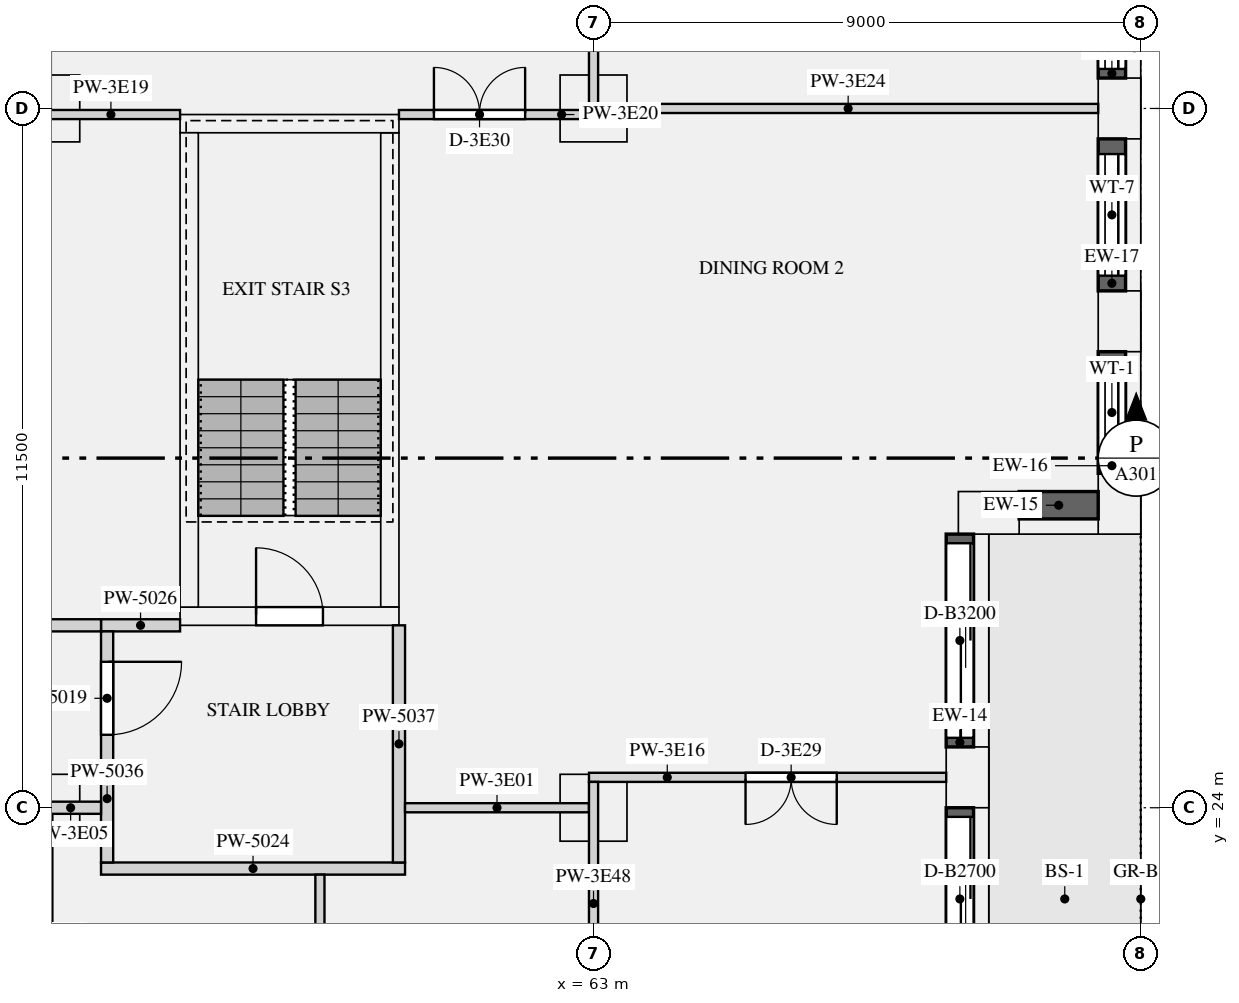
"""IFC4 building model, lengths in metres.
Left out: names, types, materials, properties, quantities, classifications, styles, units other than length and angle.
Written with IfcOpenShell. Run it as: python <this file> out.ifc"""

import sys

from ifc_helpers import new_model, si_unit, direction, frame, frame_2d, origin, origin_2d, place, context, subcontext, project, spatial, rectangle, extrude, element, fill, save


model = new_model("IFC4")
c1 = context("Model", 3, precision=1e-05, world=origin(), true_north=direction((0.0, 1.0)))
c2 = subcontext(c1, "Body", "Model", "MODEL_VIEW")
j1 = project(units=[si_unit("LENGTHUNIT", "METRE"), si_unit("PLANEANGLEUNIT", "RADIAN")], contexts=[c1])
p1 = place(None, origin())
s1 = spatial("IfcSite", under=j1, at=p1, CompositionType="ELEMENT")
p2 = place(p1, origin())
s2 = spatial("IfcBuilding", under=s1, at=p2, CompositionType="ELEMENT")
p3 = place(p2, frame((0.0, 0.0, 172.8)))
s3 = spatial("IfcBuildingStorey", under=s2, at=p3, CompositionType="ELEMENT", Elevation=172.8)
for number, where, z_axis, x_axis in (
    (1, (69.15, 24.5, 0.0), (0.0, 0.0, 1.0), (0.0, 1.0, 0.0)),
    (2, (69.5, 28.85, 0.0), (0.0, 0.0, 1.0), (1.0, 0.0, 0.0)),
    (3, (71.65, 29.0, 0.0), (0.0, 0.0, 1.0), (0.0, 1.0, 0.0)),
    (4, (71.65, 32.0, 0.0), (0.0, 0.0, 1.0), (0.0, 1.0, 0.0)),
    (5, (71.65, 35.5, 0.0), (0.0, 0.0, 1.0), (0.0, 1.0, 0.0)),
):
    element("IfcColumn", number, at=place(p3, frame(where, z_axis=z_axis, x_axis=x_axis)), inside=s3, PredefinedType="USERDEFINED", context=c2, shape_type="SweptSolid", body=[
        extrude(rectangle(XDim=1.0, YDim=0.7, at=origin_2d()), origin(), (0.0, 0.0, 1.0), 3.15),
    ])
for number, where, z_axis, x_axis in (
    (6, (54.0, 24.0, 0.0), (0.0, 0.0, 1.0), (1.0, 0.0, 0.0)),
    (7, (63.0, 24.0, 0.0), (0.0, 0.0, 1.0), (1.0, 0.0, 0.0)),
    (8, (54.0, 35.5, 0.0), (0.0, 0.0, 1.0), (1.0, 0.0, 0.0)),
    (9, (63.0, 35.5, 0.0), (0.0, 0.0, 1.0), (1.0, 0.0, 0.0)),
):
    element("IfcColumn", number, at=place(p3, frame(where, z_axis=z_axis, x_axis=x_axis)), inside=s3, PredefinedType="COLUMN", context=c2, shape_type="SweptSolid", body=[
        extrude(rectangle(XDim=1.1, YDim=1.1, at=origin_2d()), origin(), (0.0, 0.0, 1.0), 3.15),
    ])
p4 = place(p3, frame((56.2, 27.15, 0.0), z_axis=(0.0, 0.0, 1.0), x_axis=(1.0, 0.0, 0.0)))
e10 = element("IfcWall", 10, at=p4, inside=s3, PredefinedType="SHEAR", context=c2, shape_type="SweptSolid", body=[
    extrude(rectangle(XDim=3.6, YDim=0.3, at=frame_2d((1.8, 0.0))), origin(), (0.0, 0.0, 1.0), 3.15),
])
p5 = place(p4, frame((1.25, 0.0, 0.0)))
e11 = element("IfcOpeningElement", 11, at=p5, cuts=e10, PredefinedType="OPENING", context=c2, shape_type="SweptSolid", body=[
    extrude(rectangle(XDim=1.1, YDim=2.1, at=frame_2d((0.55, 1.05))), frame((0.0, 0.16, 0.0), z_axis=(0.0, -1.0, 0.0), x_axis=(1.0, 0.0, 0.0)), (0.0, 0.0, 1.0), 0.32),
])
p6 = place(p3, frame((56.2, 35.25, 0.0), z_axis=(0.0, 0.0, 1.0), x_axis=(1.0, 0.0, 0.0)))
e12 = element("IfcWall", 12, at=p6, inside=s3, PredefinedType="SHEAR", context=c2, shape_type="SweptSolid", body=[
    extrude(rectangle(XDim=3.6, YDim=0.3, at=frame_2d((1.8, 0.0))), origin(), (0.0, 0.0, 1.0), 3.15),
])
for number, where, z_axis, x_axis in (
    (13, (56.35, 27.3, 0.0), (0.0, 0.0, 1.0), (0.0, 1.0, 0.0)),
    (14, (59.65, 27.3, 0.0), (0.0, 0.0, 1.0), (0.0, 1.0, 0.0)),
):
    element("IfcWall", number, at=place(p3, frame(where, z_axis=z_axis, x_axis=x_axis)), inside=s3, PredefinedType="SHEAR", context=c2, shape_type="SweptSolid", body=[
        extrude(rectangle(XDim=7.8, YDim=0.3, at=frame_2d((3.9, 0.0))), origin(), (0.0, 0.0, 1.0), 3.15),
    ])
p7 = place(p3, frame((69.025, 21.0, 0.0), z_axis=(0.0, 0.0, 1.0), x_axis=(0.0, 1.0, 0.0)))
e15 = element("IfcWall", 15, at=p7, inside=s3, PredefinedType="SOLIDWALL", context=c2, shape_type="SweptSolid", body=[
    extrude(rectangle(XDim=3.0, YDim=0.45, at=frame_2d((1.5, 0.0))), origin(), (0.0, 0.0, 1.0), 2.83),
])
p8 = place(p7, frame((0.15, 0.0, 0.0)))
e16 = element("IfcOpeningElement", 16, at=p8, cuts=e15, PredefinedType="OPENING", context=c2, shape_type="SweptSolid", body=[
    extrude(rectangle(XDim=2.7, YDim=2.3, at=frame_2d((1.35, 1.15))), frame((0.0, 0.235, 0.0), z_axis=(0.0, -1.0, 0.0), x_axis=(1.0, 0.0, 0.0)), (0.0, 0.0, 1.0), 0.47),
])
p9 = place(p3, frame((69.025, 25.0, 0.0), z_axis=(0.0, 0.0, 1.0), x_axis=(0.0, 1.0, 0.0)))
e17 = element("IfcWall", 17, at=p9, inside=s3, PredefinedType="SOLIDWALL", context=c2, shape_type="SweptSolid", body=[
    extrude(rectangle(XDim=3.5, YDim=0.45, at=frame_2d((1.75, 0.0))), origin(), (0.0, 0.0, 1.0), 2.83),
])
p10 = place(p9, frame((0.15, 0.0, 0.0)))
e18 = element("IfcOpeningElement", 18, at=p10, cuts=e17, PredefinedType="OPENING", context=c2, shape_type="SweptSolid", body=[
    extrude(rectangle(XDim=3.2, YDim=2.3, at=frame_2d((1.6, 1.15))), frame((0.0, 0.235, 0.0), z_axis=(0.0, -1.0, 0.0), x_axis=(1.0, 0.0, 0.0)), (0.0, 0.0, 1.0), 0.47),
])
p11 = place(p3, frame((70.0, 28.975, 0.9), z_axis=(0.0, 0.0, 1.0), x_axis=(1.0, 0.0, 0.0)))
e19 = element("IfcWall", 19, at=p11, inside=s3, PredefinedType="SOLIDWALL", context=c2, shape_type="SweptSolid", body=[
    extrude(rectangle(XDim=1.3, YDim=0.45, at=frame_2d((0.65, 0.0))), origin(), (0.0, 0.0, 1.0), 1.93),
])
p12 = place(p3, frame((71.525, 29.5, 0.9), z_axis=(0.0, 0.0, 1.0), x_axis=(0.0, 1.0, 0.0)))
e20 = element("IfcWall", 20, at=p12, inside=s3, PredefinedType="SOLIDWALL", context=c2, shape_type="SweptSolid", body=[
    extrude(rectangle(XDim=2.0, YDim=0.45, at=frame_2d((1.0, 0.0))), origin(), (0.0, 0.0, 1.0), 1.93),
])
p13 = place(p12, frame((0.25, 0.0, 0.15)))
e21 = element("IfcOpeningElement", 21, at=p13, cuts=e20, PredefinedType="OPENING", context=c2, shape_type="SweptSolid", body=[
    extrude(rectangle(XDim=1.5, YDim=1.5, at=frame_2d((0.75, 0.75))), frame((0.0, 0.235, 0.0), z_axis=(0.0, -1.0, 0.0), x_axis=(1.0, 0.0, 0.0)), (0.0, 0.0, 1.0), 0.47),
])
p14 = place(p3, frame((71.525, 32.5, 0.9), z_axis=(0.0, 0.0, 1.0), x_axis=(0.0, 1.0, 0.0)))
e22 = element("IfcWall", 22, at=p14, inside=s3, PredefinedType="SOLIDWALL", context=c2, shape_type="SweptSolid", body=[
    extrude(rectangle(XDim=2.5, YDim=0.45, at=frame_2d((1.25, 0.0))), origin(), (0.0, 0.0, 1.0), 1.93),
])
p15 = place(p14, frame((0.25, 0.0, 0.15)))
e23 = element("IfcOpeningElement", 23, at=p15, cuts=e22, PredefinedType="OPENING", context=c2, shape_type="SweptSolid", body=[
    extrude(rectangle(XDim=2.0, YDim=1.5, at=frame_2d((1.0, 0.75))), frame((0.0, 0.235, 0.0), z_axis=(0.0, -1.0, 0.0), x_axis=(1.0, 0.0, 0.0)), (0.0, 0.0, 1.0), 0.47),
])
p16 = place(p3, frame((71.525, 36.0, 0.9), z_axis=(0.0, 0.0, 1.0), x_axis=(0.0, 1.0, 0.0)))
e24 = element("IfcWall", 24, at=p16, inside=s3, PredefinedType="SOLIDWALL", context=c2, shape_type="SweptSolid", body=[
    extrude(rectangle(XDim=2.3, YDim=0.45, at=frame_2d((1.15, 0.0))), origin(), (0.0, 0.0, 1.0), 1.93),
])
p17 = place(p16, frame((0.15, 0.0, 0.15)))
e25 = element("IfcOpeningElement", 25, at=p17, cuts=e24, PredefinedType="OPENING", context=c2, shape_type="SweptSolid", body=[
    extrude(rectangle(XDim=2.0, YDim=1.5, at=frame_2d((1.0, 0.75))), frame((0.0, 0.235, 0.0), z_axis=(0.0, -1.0, 0.0), x_axis=(1.0, 0.0, 0.0)), (0.0, 0.0, 1.0), 0.47),
])
p18 = place(p3, frame((54.9, 23.0, 0.0), z_axis=(0.0, 0.0, 1.0), x_axis=(1.0, 0.0, 0.0)))
e26 = element("IfcWall", 26, at=p18, inside=s3, PredefinedType="PARTITIONING", context=c2, shape_type="SweptSolid", body=[
    extrude(rectangle(XDim=5.0, YDim=0.2, at=frame_2d((2.5, 0.0))), origin(), (0.0, 0.0, 1.0), 2.83),
])
p19 = place(p3, frame((54.9, 27.0, 0.0), z_axis=(0.0, 0.0, 1.0), x_axis=(1.0, 0.0, 0.0)))
e27 = element("IfcWall", 27, at=p19, inside=s3, PredefinedType="PARTITIONING", context=c2, shape_type="SweptSolid", body=[
    extrude(rectangle(XDim=1.3, YDim=0.2, at=frame_2d((0.65, 0.0))), origin(), (0.0, 0.0, 1.0), 2.83),
])
p20 = place(p3, frame((55.0, 23.1, 0.0), z_axis=(0.0, 0.0, 1.0), x_axis=(0.0, 1.0, 0.0)))
e28 = element("IfcWall", 28, at=p20, inside=s3, PredefinedType="PARTITIONING", context=c2, shape_type="SweptSolid", body=[
    extrude(rectangle(XDim=3.8, YDim=0.2, at=frame_2d((1.9, 0.0))), origin(), (0.0, 0.0, 1.0), 2.83),
])
p21 = place(p20, frame((2.1, 0.0, 0.0)))
e29 = element("IfcOpeningElement", 29, at=p21, cuts=e28, PredefinedType="OPENING", context=c2, shape_type="SweptSolid", body=[
    extrude(rectangle(XDim=1.2, YDim=2.1, at=frame_2d((0.6, 1.05))), frame((0.0, 0.11, 0.0), z_axis=(0.0, -1.0, 0.0), x_axis=(1.0, 0.0, 0.0)), (0.0, 0.0, 1.0), 0.22),
])
p22 = place(p3, frame((59.8, 23.1, 0.0), z_axis=(0.0, 0.0, 1.0), x_axis=(0.0, 1.0, 0.0)))
e30 = element("IfcWall", 30, at=p22, inside=s3, PredefinedType="PARTITIONING", context=c2, shape_type="SweptSolid", body=[
    extrude(rectangle(XDim=3.9, YDim=0.2, at=frame_2d((1.95, 0.0))), origin(), (0.0, 0.0, 1.0), 2.83),
])
p23 = place(p3, frame((59.9, 24.0, 0.0), z_axis=(0.0, 0.0, 1.0), x_axis=(1.0, 0.0, 0.0)))
e31 = element("IfcWall", 31, at=p23, inside=s3, PredefinedType="PARTITIONING", context=c2, shape_type="SweptSolid", body=[
    extrude(rectangle(XDim=3.025, YDim=0.15, at=frame_2d((1.513, 0.0))), origin(), (0.0, 0.0, 1.0), 2.83),
])
p24 = place(p3, frame((53.9, 24.0, 0.0), z_axis=(0.0, 0.0, 1.0), x_axis=(1.0, 0.0, 0.0)))
e32 = element("IfcWall", 32, at=p24, inside=s3, PredefinedType="PARTITIONING", context=c2, shape_type="SweptSolid", body=[
    extrude(rectangle(XDim=1.0, YDim=0.2, at=frame_2d((0.5, 0.0))), origin(), (0.0, 0.0, 1.0), 2.83),
])
p25 = place(p3, frame((47.9, 27.0, 0.0), z_axis=(0.0, 0.0, 1.0), x_axis=(1.0, 0.0, 0.0)))
e33 = element("IfcWall", 33, at=p25, inside=s3, PredefinedType="PARTITIONING", context=c2, shape_type="SweptSolid", body=[
    extrude(rectangle(XDim=7.0, YDim=0.2, at=frame_2d((3.5, 0.0))), origin(), (0.0, 0.0, 1.0), 2.83),
])
p26 = place(p3, frame((62.925, 24.5, 0.0), z_axis=(0.0, 0.0, 1.0), x_axis=(1.0, 0.0, 0.0)))
e34 = element("IfcWall", 34, at=p26, inside=s3, PredefinedType="PARTITIONING", context=c2, shape_type="SweptSolid", body=[
    extrude(rectangle(XDim=5.875, YDim=0.15, at=frame_2d((2.938, 0.0))), origin(), (0.0, 0.0, 1.0), 2.83),
])
p27 = place(p26, frame((2.575, 0.0, 0.0)))
e35 = element("IfcOpeningElement", 35, at=p27, cuts=e34, PredefinedType="OPENING", context=c2, shape_type="SweptSolid", body=[
    extrude(rectangle(XDim=1.5, YDim=2.1, at=frame_2d((0.75, 1.05))), frame((0.0, 0.085, 0.0), z_axis=(0.0, -1.0, 0.0), x_axis=(1.0, 0.0, 0.0)), (0.0, 0.0, 1.0), 0.17),
])
p28 = place(p3, frame((53.925, 35.4, 0.0), z_axis=(0.0, 0.0, 1.0), x_axis=(1.0, 0.0, 0.0)))
e36 = element("IfcWall", 36, at=p28, inside=s3, PredefinedType="PARTITIONING", context=c2, shape_type="SweptSolid", body=[
    extrude(rectangle(XDim=2.275, YDim=0.15, at=frame_2d((1.137, 0.0))), origin(), (0.0, 0.0, 1.0), 2.83),
])
p29 = place(p3, frame((59.8, 35.4, 0.0), z_axis=(0.0, 0.0, 1.0), x_axis=(1.0, 0.0, 0.0)))
e37 = element("IfcWall", 37, at=p29, inside=s3, PredefinedType="PARTITIONING", context=c2, shape_type="SweptSolid", body=[
    extrude(rectangle(XDim=3.275, YDim=0.15, at=frame_2d((1.637, 0.0))), origin(), (0.0, 0.0, 1.0), 2.83),
])
p30 = place(p29, frame((0.575, 0.0, 0.0)))
e38 = element("IfcOpeningElement", 38, at=p30, cuts=e37, PredefinedType="OPENING", context=c2, shape_type="SweptSolid", body=[
    extrude(rectangle(XDim=1.5, YDim=2.1, at=frame_2d((0.75, 1.05))), frame((0.0, 0.085, 0.0), z_axis=(0.0, -1.0, 0.0), x_axis=(1.0, 0.0, 0.0)), (0.0, 0.0, 1.0), 0.17),
])
p31 = place(p3, frame((63.075, 35.5, 0.0), z_axis=(0.0, 0.0, 1.0), x_axis=(1.0, 0.0, 0.0)))
e39 = element("IfcWall", 39, at=p31, inside=s3, PredefinedType="PARTITIONING", context=c2, shape_type="SweptSolid", body=[
    extrude(rectangle(XDim=8.225, YDim=0.15, at=frame_2d((4.113, 0.0))), origin(), (0.0, 0.0, 1.0), 2.83),
])
p32 = place(p3, frame((58.5, 12.575, 0.0), z_axis=(0.0, 0.0, 1.0), x_axis=(0.0, 1.0, 0.0)))
e40 = element("IfcWall", 40, at=p32, inside=s3, PredefinedType="PARTITIONING", context=c2, shape_type="SweptSolid", body=[
    extrude(rectangle(XDim=10.325, YDim=0.15, at=frame_2d((5.163, 0.0))), origin(), (0.0, 0.0, 1.0), 2.83),
])
p33 = place(p32, frame((6.75, 0.0, 0.0)))
e41 = element("IfcOpeningElement", 41, at=p33, cuts=e40, PredefinedType="OPENING", context=c2, shape_type="SweptSolid", body=[
    extrude(rectangle(XDim=0.9, YDim=2.1, at=frame_2d((0.45, 1.05))), frame((0.0, 0.085, 0.0), z_axis=(0.0, -1.0, 0.0), x_axis=(1.0, 0.0, 0.0)), (0.0, 0.0, 1.0), 0.17),
])
p34 = place(p3, frame((63.0, 16.575, 0.0), z_axis=(0.0, 0.0, 1.0), x_axis=(0.0, 1.0, 0.0)))
e42 = element("IfcWall", 42, at=p34, inside=s3, PredefinedType="PARTITIONING", context=c2, shape_type="SweptSolid", body=[
    extrude(rectangle(XDim=7.85, YDim=0.15, at=frame_2d((3.925, 0.0))), origin(), (0.0, 0.0, 1.0), 2.83),
])
p35 = place(p34, frame((2.95, 0.0, 0.0)))
e43 = element("IfcOpeningElement", 43, at=p35, cuts=e42, PredefinedType="OPENING", context=c2, shape_type="SweptSolid", body=[
    extrude(rectangle(XDim=0.9, YDim=2.1, at=frame_2d((0.45, 1.05))), frame((0.0, 0.085, 0.0), z_axis=(0.0, -1.0, 0.0), x_axis=(1.0, 0.0, 0.0)), (0.0, 0.0, 1.0), 0.17),
])
p36 = place(p3, frame((63.0, 35.475, 0.0), z_axis=(0.0, 0.0, 1.0), x_axis=(0.0, 1.0, 0.0)))
e44 = element("IfcWall", 44, at=p36, inside=s3, PredefinedType="PARTITIONING", context=c2, shape_type="SweptSolid", body=[
    extrude(rectangle(XDim=7.325, YDim=0.15, at=frame_2d((3.663, 0.0))), origin(), (0.0, 0.0, 1.0), 2.83),
])
p37 = place(p36, frame((1.6, 0.0, 0.0)))
e45 = element("IfcOpeningElement", 45, at=p37, cuts=e44, PredefinedType="OPENING", context=c2, shape_type="SweptSolid", body=[
    extrude(rectangle(XDim=0.9, YDim=2.1, at=frame_2d((0.45, 1.05))), frame((0.0, 0.085, 0.0), z_axis=(0.0, -1.0, 0.0), x_axis=(1.0, 0.0, 0.0)), (0.0, 0.0, 1.0), 0.17),
])
p38 = place(p8, origin())
e46 = element("IfcDoor", 46, at=p38, inside=s3, OperationType="SLIDING_TO_LEFT", PredefinedType="DOOR", context=c2, shape_type="SweptSolid", body=[
    extrude(rectangle(XDim=2.7, YDim=2.3, at=frame_2d((1.35, 1.15))), frame((0.0, -0.07, 0.0), z_axis=(0.0, -1.0, 0.0), x_axis=(1.0, 0.0, 0.0)), (0.0, 0.0, 1.0), 0.05),
])
fill(e16, e46)
p39 = place(p10, origin())
e47 = element("IfcDoor", 47, at=p39, inside=s3, OperationType="SLIDING_TO_LEFT", PredefinedType="DOOR", context=c2, shape_type="SweptSolid", body=[
    extrude(rectangle(XDim=3.2, YDim=2.3, at=frame_2d((1.6, 1.15))), frame((0.0, -0.07, 0.0), z_axis=(0.0, -1.0, 0.0), x_axis=(1.0, 0.0, 0.0)), (0.0, 0.0, 1.0), 0.05),
])
fill(e18, e47)
p40 = place(p13, origin())
e48 = element("IfcWindow", 48, at=p40, inside=s3, PartitioningType="SINGLE_PANEL", PredefinedType="WINDOW", context=c2, shape_type="SweptSolid", body=[
    extrude(rectangle(XDim=1.5, YDim=1.5, at=frame_2d((0.75, 0.75))), frame((0.0, -0.065, 0.0), z_axis=(0.0, -1.0, 0.0), x_axis=(1.0, 0.0, 0.0)), (0.0, 0.0, 1.0), 0.06),
])
fill(e21, e48)
p41 = place(p15, origin())
e49 = element("IfcWindow", 49, at=p41, inside=s3, PartitioningType="SINGLE_PANEL", PredefinedType="WINDOW", context=c2, shape_type="SweptSolid", body=[
    extrude(rectangle(XDim=2.0, YDim=1.5, at=frame_2d((1.0, 0.75))), frame((0.0, -0.065, 0.0), z_axis=(0.0, -1.0, 0.0), x_axis=(1.0, 0.0, 0.0)), (0.0, 0.0, 1.0), 0.06),
])
fill(e23, e49)
p42 = place(p17, origin())
e50 = element("IfcWindow", 50, at=p42, inside=s3, PartitioningType="SINGLE_PANEL", PredefinedType="WINDOW", context=c2, shape_type="SweptSolid", body=[
    extrude(rectangle(XDim=2.0, YDim=1.5, at=frame_2d((1.0, 0.75))), frame((0.0, -0.065, 0.0), z_axis=(0.0, -1.0, 0.0), x_axis=(1.0, 0.0, 0.0)), (0.0, 0.0, 1.0), 0.06),
])
fill(e25, e50)
p43 = place(p5, origin())
e51 = element("IfcDoor", 51, at=p43, inside=s3, OperationType="SINGLE_SWING_LEFT", PredefinedType="DOOR", context=c2, shape_type="SweptSolid", body=[
    extrude(rectangle(XDim=1.1, YDim=2.1, at=frame_2d((0.55, 1.05))), frame((0.0, 0.025, 0.0), z_axis=(0.0, -1.0, 0.0), x_axis=(1.0, 0.0, 0.0)), (0.0, 0.0, 1.0), 0.05),
])
fill(e11, e51)
p44 = place(p21, frame((1.2, 0.0, 0.0), z_axis=(0.0, 0.0, 1.0), x_axis=(-1.0, 0.0, 0.0)))
e52 = element("IfcDoor", 52, at=p44, inside=s3, OperationType="SINGLE_SWING_LEFT", PredefinedType="DOOR", context=c2, shape_type="SweptSolid", body=[
    extrude(rectangle(XDim=1.2, YDim=2.1, at=frame_2d((0.6, 1.05))), frame((0.0, 0.025, 0.0), z_axis=(0.0, -1.0, 0.0), x_axis=(1.0, 0.0, 0.0)), (0.0, 0.0, 1.0), 0.05),
])
fill(e29, e52)
p45 = place(p27, frame((1.5, 0.0, 0.0), z_axis=(0.0, 0.0, 1.0), x_axis=(-1.0, 0.0, 0.0)))
e53 = element("IfcDoor", 53, at=p45, inside=s3, OperationType="DOUBLE_DOOR_SINGLE_SWING", PredefinedType="DOOR", context=c2, shape_type="SweptSolid", body=[
    extrude(rectangle(XDim=1.5, YDim=2.1, at=frame_2d((0.75, 1.05))), frame((0.0, 0.025, 0.0), z_axis=(0.0, -1.0, 0.0), x_axis=(1.0, 0.0, 0.0)), (0.0, 0.0, 1.0), 0.05),
])
fill(e35, e53)
p46 = place(p30, origin())
e54 = element("IfcDoor", 54, at=p46, inside=s3, OperationType="DOUBLE_DOOR_SINGLE_SWING", PredefinedType="DOOR", context=c2, shape_type="SweptSolid", body=[
    extrude(rectangle(XDim=1.5, YDim=2.1, at=frame_2d((0.75, 1.05))), frame((0.0, 0.025, 0.0), z_axis=(0.0, -1.0, 0.0), x_axis=(1.0, 0.0, 0.0)), (0.0, 0.0, 1.0), 0.05),
])
fill(e38, e54)
save(model, sys.argv[1])
